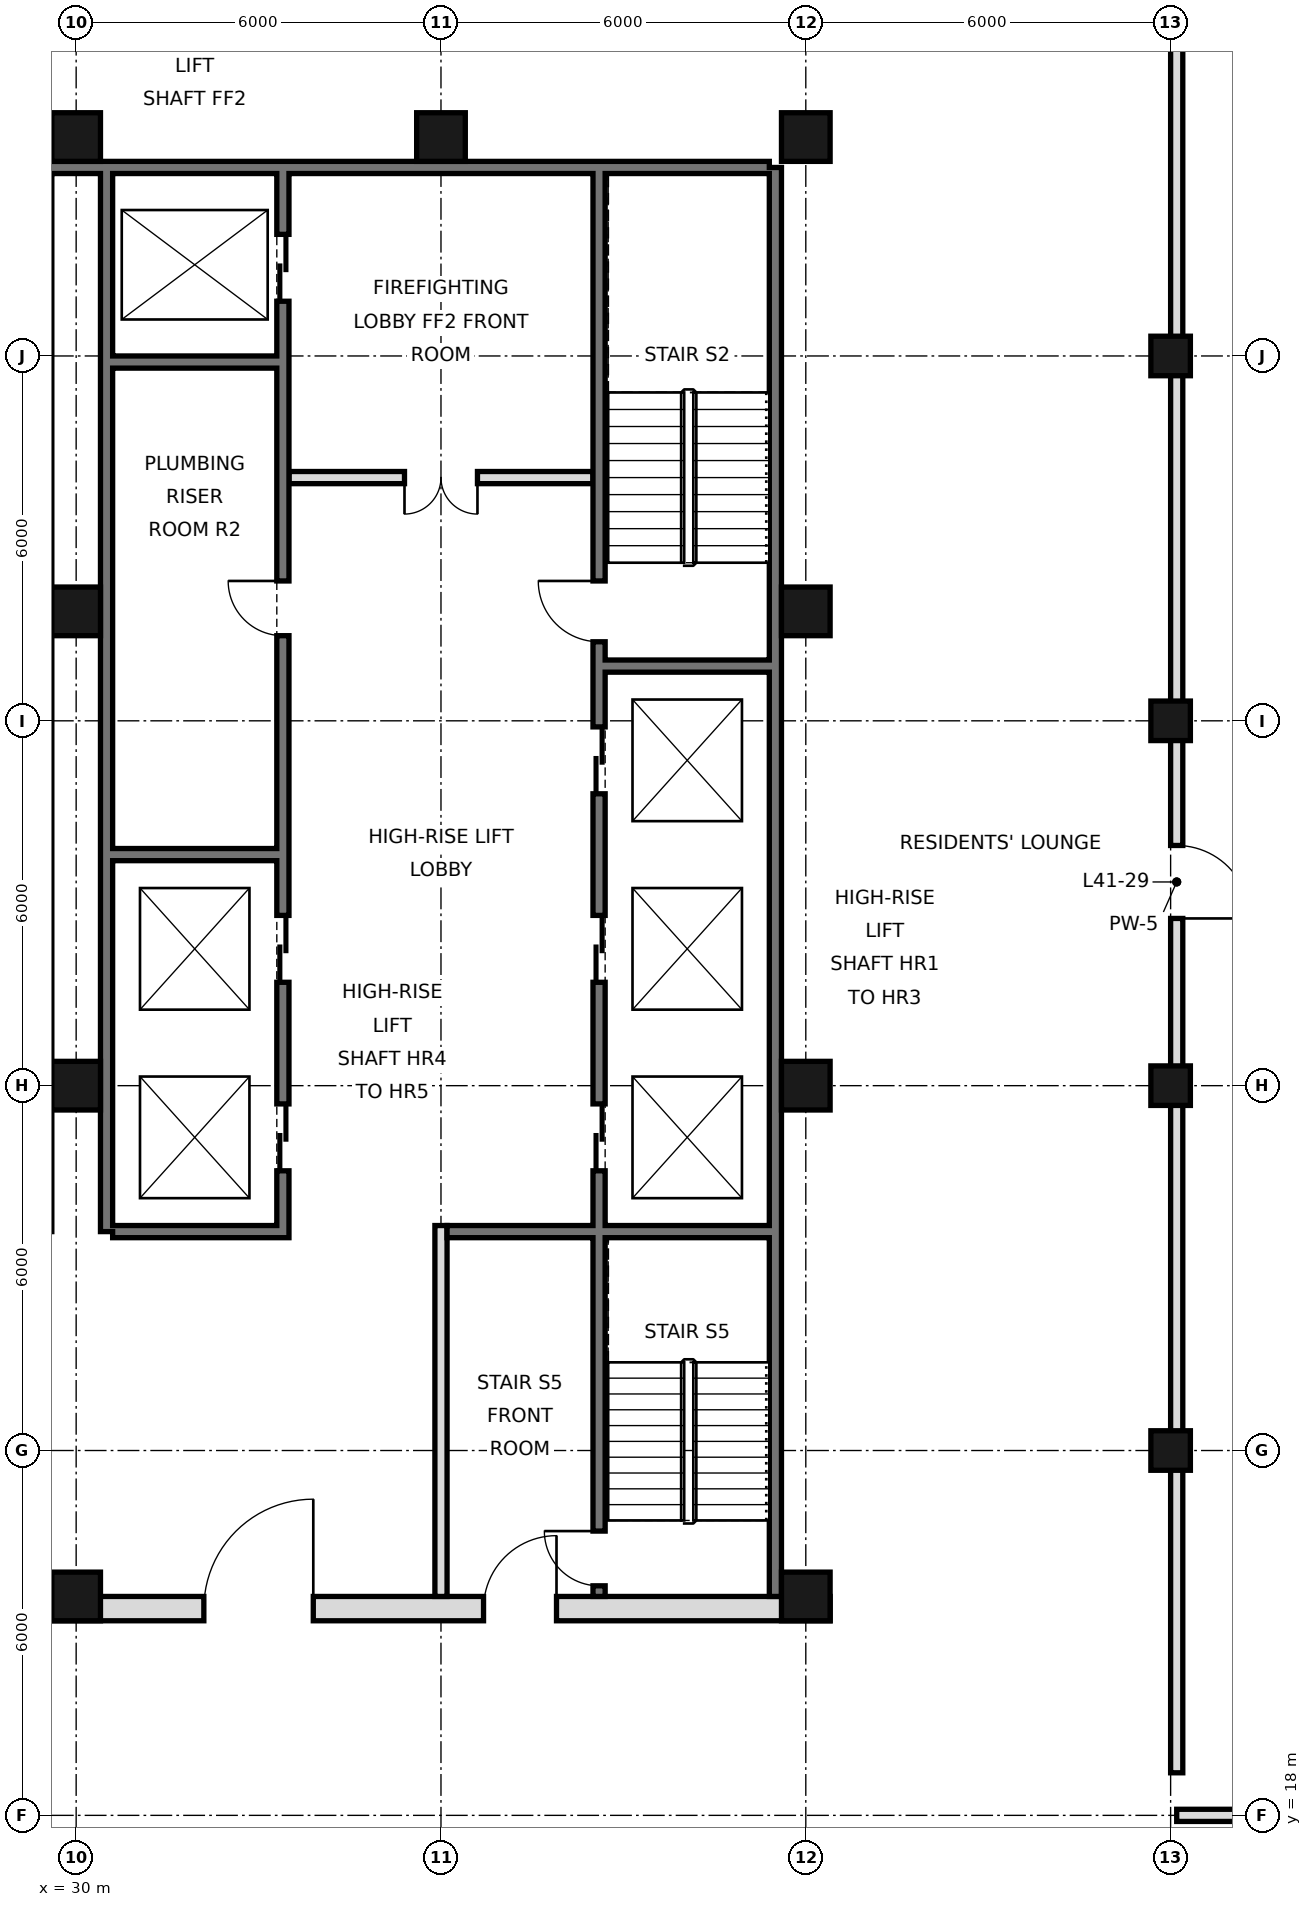
"""IFC4 building model, lengths in metres.
Left out: names, types, materials, properties, quantities, classifications, styles, units other than length and angle.
Written with IfcOpenShell. Run it as: python <this file> out.ifc"""

import sys

from ifc_helpers import new_model, si_unit, direction, frame, frame_2d, origin, origin_2d, place, context, subcontext, project, spatial, rectangle, hollow_rectangle, extrude, element, fill, save


model = new_model("IFC4")
c1 = context("Model", 3, precision=1e-05, world=origin(), true_north=direction((0.0, 1.0)))
c2 = subcontext(c1, "Body", "Model", "MODEL_VIEW")
j1 = project(units=[si_unit("LENGTHUNIT", "METRE"), si_unit("PLANEANGLEUNIT", "RADIAN")], contexts=[c1])
p1 = place(None, origin())
s1 = spatial("IfcSite", under=j1, at=p1, CompositionType="ELEMENT")
p2 = place(p1, origin())
s2 = spatial("IfcBuilding", under=s1, at=p2, CompositionType="ELEMENT")
p3 = place(p2, frame((0.0, 0.0, 178.0)))
s3 = spatial("IfcBuildingStorey", under=s2, at=p3, CompositionType="ELEMENT", Elevation=178.0)
for number, where, z_axis, x_axis in (
    (1, (30.0, 21.6, 0.0), (0.0, 0.0, 1.0), (1.0, 0.0, 0.0)),
    (2, (30.0, 30.0, 0.0), (0.0, 0.0, 1.0), (1.0, 0.0, 0.0)),
    (3, (30.0, 37.8, 0.0), (0.0, 0.0, 1.0), (1.0, 0.0, 0.0)),
    (4, (30.0, 45.6, 0.0), (0.0, 0.0, 1.0), (1.0, 0.0, 0.0)),
    (5, (36.0, 45.6, 0.0), (0.0, 0.0, 1.0), (1.0, 0.0, 0.0)),
    (6, (42.0, 21.6, 0.0), (0.0, 0.0, 1.0), (1.0, 0.0, 0.0)),
    (7, (42.0, 30.0, 0.0), (0.0, 0.0, 1.0), (1.0, 0.0, 0.0)),
    (8, (42.0, 37.8, 0.0), (0.0, 0.0, 1.0), (1.0, 0.0, 0.0)),
    (9, (42.0, 45.6, 0.0), (0.0, 0.0, 1.0), (1.0, 0.0, 0.0)),
):
    element("IfcColumn", number, at=place(p3, frame(where, z_axis=z_axis, x_axis=x_axis)), inside=s3, PredefinedType="COLUMN", context=c2, shape_type="SweptSolid", body=[
        extrude(hollow_rectangle(XDim=0.8, YDim=0.8, WallThickness=0.045, at=origin_2d()), origin(), (0.0, 0.0, 1.0), 3.6),
    ])
for number, where, z_axis, x_axis in (
    (10, (48.0, 24.0, 0.0), (0.0, 0.0, 1.0), (1.0, 0.0, 0.0)),
    (11, (48.0, 30.0, 0.0), (0.0, 0.0, 1.0), (1.0, 0.0, 0.0)),
    (12, (48.0, 36.0, 0.0), (0.0, 0.0, 1.0), (1.0, 0.0, 0.0)),
    (13, (48.0, 42.0, 0.0), (0.0, 0.0, 1.0), (1.0, 0.0, 0.0)),
):
    element("IfcColumn", number, at=place(p3, frame(where, z_axis=z_axis, x_axis=x_axis)), inside=s3, PredefinedType="COLUMN", context=c2, shape_type="SweptSolid", body=[
        extrude(hollow_rectangle(XDim=0.65, YDim=0.65, WallThickness=0.032, at=origin_2d()), origin(), (0.0, 0.0, 1.0), 3.6),
    ])
p4 = place(p3, frame((48.1, 18.7, 0.0), z_axis=(0.0, 0.0, 1.0), x_axis=(0.0, 1.0, 0.0)))
e14 = element("IfcWall", 14, at=p4, inside=s3, PredefinedType="SOLIDWALL", context=c2, shape_type="SweptSolid", body=[
    extrude(rectangle(XDim=29.3, YDim=0.2, at=frame_2d((14.65, 0.0))), origin(), (0.0, 0.0, 1.0), 2.72),
])
p5 = place(p4, frame((14.05, 0.0, 0.0)))
e15 = element("IfcOpeningElement", 15, at=p5, cuts=e14, PredefinedType="OPENING", context=c2, shape_type="SweptSolid", body=[
    extrude(rectangle(XDim=1.2, YDim=2.4, at=frame_2d((0.6, 1.2))), frame((0.0, 0.11, 0.0), z_axis=(0.0, -1.0, 0.0), x_axis=(1.0, 0.0, 0.0)), (0.0, 0.0, 1.0), 0.22),
])
p6 = place(p3, frame((48.1, 18.0, 0.0), z_axis=(0.0, 0.0, 1.0), x_axis=(1.0, 0.0, 0.0)))
e16 = element("IfcWall", 16, at=p6, inside=s3, PredefinedType="SOLIDWALL", context=c2, shape_type="SweptSolid", body=[
    extrude(rectangle(XDim=7.1, YDim=0.2, at=frame_2d((3.55, 0.0))), origin(), (0.0, 0.0, 1.0), 2.72),
])
p7 = place(p3, frame((41.5, 21.6, 0.0), z_axis=(0.0, 0.0, 1.0), x_axis=(0.0, 1.0, 0.0)))
e17 = element("IfcWall", 17, at=p7, inside=s3, PredefinedType="SOLIDWALL", context=c2, shape_type="SweptSolid", body=[
    extrude(rectangle(XDim=23.5, YDim=0.2, at=frame_2d((11.75, 0.0))), origin(), (0.0, 0.0, 1.0), 3.42),
])
p8 = place(p3, frame((6.6, 45.1, 0.0), z_axis=(0.0, 0.0, 1.0), x_axis=(1.0, 0.0, 0.0)))
e18 = element("IfcWall", 18, at=p8, inside=s3, PredefinedType="SOLIDWALL", context=c2, shape_type="SweptSolid", body=[
    extrude(rectangle(XDim=34.8, YDim=0.2, at=frame_2d((17.4, 0.0))), origin(), (0.0, 0.0, 1.0), 3.42),
])
p9 = place(p3, frame((30.5, 27.6, 0.0), z_axis=(0.0, 0.0, 1.0), x_axis=(0.0, 1.0, 0.0)))
e19 = element("IfcWall", 19, at=p9, inside=s3, PredefinedType="SOLIDWALL", context=c2, shape_type="SweptSolid", body=[
    extrude(rectangle(XDim=17.5, YDim=0.2, at=frame_2d((8.75, 0.0))), origin(), (0.0, 0.0, 1.0), 3.42),
])
p10 = place(p3, frame((5.6, 21.4, 0.0), z_axis=(0.0, 0.0, 1.0), x_axis=(1.0, 0.0, 0.0)))
e20 = element("IfcWall", 20, at=p10, inside=s3, PredefinedType="SOLIDWALL", context=c2, shape_type="SweptSolid", body=[
    extrude(rectangle(XDim=36.8, YDim=0.4, at=frame_2d((18.4, 0.0))), origin(), (0.0, 0.0, 1.0), 3.42),
])
p11 = place(p10, frame((8.5, 0.0, 0.0)))
e21 = element("IfcOpeningElement", 21, at=p11, cuts=e20, PredefinedType="OPENING", context=c2, shape_type="SweptSolid", body=[
    extrude(rectangle(XDim=1.8, YDim=2.1, at=frame_2d((0.9, 1.05))), frame((0.0, 0.21, 0.0), z_axis=(0.0, -1.0, 0.0), x_axis=(1.0, 0.0, 0.0)), (0.0, 0.0, 1.0), 0.42),
])
p12 = place(p10, frame((17.5, 0.0, 0.0)))
e22 = element("IfcOpeningElement", 22, at=p12, cuts=e20, PredefinedType="OPENING", context=c2, shape_type="SweptSolid", body=[
    extrude(rectangle(XDim=1.8, YDim=2.1, at=frame_2d((0.9, 1.05))), frame((0.0, 0.21, 0.0), z_axis=(0.0, -1.0, 0.0), x_axis=(1.0, 0.0, 0.0)), (0.0, 0.0, 1.0), 0.42),
])
p13 = place(p10, frame((26.5, 0.0, 0.0)))
e23 = element("IfcOpeningElement", 23, at=p13, cuts=e20, PredefinedType="OPENING", context=c2, shape_type="SweptSolid", body=[
    extrude(rectangle(XDim=1.8, YDim=2.1, at=frame_2d((0.9, 1.05))), frame((0.0, 0.21, 0.0), z_axis=(0.0, -1.0, 0.0), x_axis=(1.0, 0.0, 0.0)), (0.0, 0.0, 1.0), 0.42),
])
p14 = place(p10, frame((4.5, 0.0, 0.0)))
e24 = element("IfcOpeningElement", 24, at=p14, cuts=e20, PredefinedType="OPENING", context=c2, shape_type="SweptSolid", body=[
    extrude(rectangle(XDim=1.2, YDim=2.1, at=frame_2d((0.6, 1.05))), frame((0.0, 0.21, 0.0), z_axis=(0.0, -1.0, 0.0), x_axis=(1.0, 0.0, 0.0)), (0.0, 0.0, 1.0), 0.42),
])
p15 = place(p10, frame((31.1, 0.0, 0.0)))
e25 = element("IfcOpeningElement", 25, at=p15, cuts=e20, PredefinedType="OPENING", context=c2, shape_type="SweptSolid", body=[
    extrude(rectangle(XDim=1.2, YDim=2.1, at=frame_2d((0.6, 1.05))), frame((0.0, 0.21, 0.0), z_axis=(0.0, -1.0, 0.0), x_axis=(1.0, 0.0, 0.0)), (0.0, 0.0, 1.0), 0.42),
])
p16 = place(p3, frame((33.4, 27.5, 0.0), z_axis=(0.0, 0.0, 1.0), x_axis=(0.0, 1.0, 0.0)))
e26 = element("IfcWall", 26, at=p16, inside=s3, PredefinedType="SOLIDWALL", context=c2, shape_type="SweptSolid", body=[
    extrude(rectangle(XDim=17.5, YDim=0.2, at=frame_2d((8.75, 0.0))), origin(), (0.0, 0.0, 1.0), 3.42),
])
p17 = place(p16, frame((1.1, 0.0, 0.0)))
e27 = element("IfcOpeningElement", 27, at=p17, cuts=e26, PredefinedType="OPENING", context=c2, shape_type="SweptSolid", body=[
    extrude(rectangle(XDim=1.1, YDim=2.1, at=frame_2d((0.55, 1.05))), frame((0.0, 0.11, 0.0), z_axis=(0.0, -1.0, 0.0), x_axis=(1.0, 0.0, 0.0)), (0.0, 0.0, 1.0), 0.22),
])
p18 = place(p16, frame((4.2, 0.0, 0.0)))
e28 = element("IfcOpeningElement", 28, at=p18, cuts=e26, PredefinedType="OPENING", context=c2, shape_type="SweptSolid", body=[
    extrude(rectangle(XDim=1.1, YDim=2.1, at=frame_2d((0.55, 1.05))), frame((0.0, 0.11, 0.0), z_axis=(0.0, -1.0, 0.0), x_axis=(1.0, 0.0, 0.0)), (0.0, 0.0, 1.0), 0.22),
])
p19 = place(p16, frame((15.4, 0.0, 0.0)))
e29 = element("IfcOpeningElement", 29, at=p19, cuts=e26, PredefinedType="OPENING", context=c2, shape_type="SweptSolid", body=[
    extrude(rectangle(XDim=1.1, YDim=2.1, at=frame_2d((0.55, 1.05))), frame((0.0, 0.11, 0.0), z_axis=(0.0, -1.0, 0.0), x_axis=(1.0, 0.0, 0.0)), (0.0, 0.0, 1.0), 0.22),
])
p20 = place(p16, frame((9.9, 0.0, 0.0)))
e30 = element("IfcOpeningElement", 30, at=p20, cuts=e26, PredefinedType="OPENING", context=c2, shape_type="SweptSolid", body=[
    extrude(rectangle(XDim=0.9, YDim=2.1, at=frame_2d((0.45, 1.05))), frame((0.0, 0.11, 0.0), z_axis=(0.0, -1.0, 0.0), x_axis=(1.0, 0.0, 0.0)), (0.0, 0.0, 1.0), 0.22),
])
p21 = place(p3, frame((36.0, 21.6, 0.0), z_axis=(0.0, 0.0, 1.0), x_axis=(0.0, 1.0, 0.0)))
e31 = element("IfcWall", 31, at=p21, inside=s3, PredefinedType="PARTITIONING", context=c2, shape_type="SweptSolid", body=[
    extrude(rectangle(XDim=6.1, YDim=0.2, at=frame_2d((3.05, 0.0))), origin(), (0.0, 0.0, 1.0), 3.42),
])
p22 = place(p3, frame((38.6, 21.6, 0.0), z_axis=(0.0, 0.0, 1.0), x_axis=(0.0, 1.0, 0.0)))
e32 = element("IfcWall", 32, at=p22, inside=s3, PredefinedType="SOLIDWALL", context=c2, shape_type="SweptSolid", body=[
    extrude(rectangle(XDim=23.4, YDim=0.2, at=frame_2d((11.7, 0.0))), origin(), (0.0, 0.0, 1.0), 3.42),
])
p23 = place(p22, frame((7.0, 0.0, 0.0)))
e33 = element("IfcOpeningElement", 33, at=p23, cuts=e32, PredefinedType="OPENING", context=c2, shape_type="SweptSolid", body=[
    extrude(rectangle(XDim=1.1, YDim=2.1, at=frame_2d((0.55, 1.05))), frame((0.0, 0.11, 0.0), z_axis=(0.0, -1.0, 0.0), x_axis=(1.0, 0.0, 0.0)), (0.0, 0.0, 1.0), 0.22),
])
p24 = place(p22, frame((10.1, 0.0, 0.0)))
e34 = element("IfcOpeningElement", 34, at=p24, cuts=e32, PredefinedType="OPENING", context=c2, shape_type="SweptSolid", body=[
    extrude(rectangle(XDim=1.1, YDim=2.1, at=frame_2d((0.55, 1.05))), frame((0.0, 0.11, 0.0), z_axis=(0.0, -1.0, 0.0), x_axis=(1.0, 0.0, 0.0)), (0.0, 0.0, 1.0), 0.22),
])
p25 = place(p22, frame((13.2, 0.0, 0.0)))
e35 = element("IfcOpeningElement", 35, at=p25, cuts=e32, PredefinedType="OPENING", context=c2, shape_type="SweptSolid", body=[
    extrude(rectangle(XDim=1.1, YDim=2.1, at=frame_2d((0.55, 1.05))), frame((0.0, 0.11, 0.0), z_axis=(0.0, -1.0, 0.0), x_axis=(1.0, 0.0, 0.0)), (0.0, 0.0, 1.0), 0.22),
])
p26 = place(p22, frame((15.7, 0.0, 0.0)))
e36 = element("IfcOpeningElement", 36, at=p26, cuts=e32, PredefinedType="OPENING", context=c2, shape_type="SweptSolid", body=[
    extrude(rectangle(XDim=1.0, YDim=2.1, at=frame_2d((0.5, 1.05))), frame((0.0, 0.11, 0.0), z_axis=(0.0, -1.0, 0.0), x_axis=(1.0, 0.0, 0.0)), (0.0, 0.0, 1.0), 0.22),
])
p27 = place(p22, frame((0.175, 0.0, 0.0)))
e37 = element("IfcOpeningElement", 37, at=p27, cuts=e32, PredefinedType="OPENING", context=c2, shape_type="SweptSolid", body=[
    extrude(rectangle(XDim=0.9, YDim=2.1, at=frame_2d((0.45, 1.05))), frame((0.0, 0.11, 0.0), z_axis=(0.0, -1.0, 0.0), x_axis=(1.0, 0.0, 0.0)), (0.0, 0.0, 1.0), 0.22),
])
p28 = place(p3, frame((30.6, 27.6, 0.0), z_axis=(0.0, 0.0, 1.0), x_axis=(1.0, 0.0, 0.0)))
e38 = element("IfcWall", 38, at=p28, inside=s3, PredefinedType="SOLIDWALL", context=c2, shape_type="SweptSolid", body=[
    extrude(rectangle(XDim=2.7, YDim=0.2, at=frame_2d((1.35, 0.0))), origin(), (0.0, 0.0, 1.0), 3.42),
])
p29 = place(p3, frame((36.1, 27.6, 0.0), z_axis=(0.0, 0.0, 1.0), x_axis=(1.0, 0.0, 0.0)))
e39 = element("IfcWall", 39, at=p29, inside=s3, PredefinedType="SOLIDWALL", context=c2, shape_type="SweptSolid", body=[
    extrude(rectangle(XDim=5.3, YDim=0.2, at=frame_2d((2.65, 0.0))), origin(), (0.0, 0.0, 1.0), 3.42),
])
for number, where, z_axis, x_axis in (
    (40, (30.6, 33.8, 0.0), (0.0, 0.0, 1.0), (1.0, 0.0, 0.0)),
    (41, (38.7, 36.9, 0.0), (0.0, 0.0, 1.0), (1.0, 0.0, 0.0)),
):
    element("IfcWall", number, at=place(p3, frame(where, z_axis=z_axis, x_axis=x_axis)), inside=s3, PredefinedType="SOLIDWALL", context=c2, shape_type="SweptSolid", body=[
        extrude(rectangle(XDim=2.7, YDim=0.2, at=frame_2d((1.35, 0.0))), origin(), (0.0, 0.0, 1.0), 3.42),
    ])
p30 = place(p3, frame((33.5, 40.0, 0.0), z_axis=(0.0, 0.0, 1.0), x_axis=(1.0, 0.0, 0.0)))
e42 = element("IfcWall", 42, at=p30, inside=s3, PredefinedType="PARTITIONING", context=c2, shape_type="SweptSolid", body=[
    extrude(rectangle(XDim=5.0, YDim=0.2, at=frame_2d((2.5, 0.0))), origin(), (0.0, 0.0, 1.0), 3.42),
])
p31 = place(p30, frame((1.9, 0.0, 0.0)))
e43 = element("IfcOpeningElement", 43, at=p31, cuts=e42, PredefinedType="OPENING", context=c2, shape_type="SweptSolid", body=[
    extrude(rectangle(XDim=1.2, YDim=2.1, at=frame_2d((0.6, 1.05))), frame((0.0, 0.11, 0.0), z_axis=(0.0, -1.0, 0.0), x_axis=(1.0, 0.0, 0.0)), (0.0, 0.0, 1.0), 0.22),
])
p32 = place(p3, frame((30.6, 41.9, 0.0), z_axis=(0.0, 0.0, 1.0), x_axis=(1.0, 0.0, 0.0)))
e44 = element("IfcWall", 44, at=p32, inside=s3, PredefinedType="SOLIDWALL", context=c2, shape_type="SweptSolid", body=[
    extrude(rectangle(XDim=2.7, YDim=0.2, at=frame_2d((1.35, 0.0))), origin(), (0.0, 0.0, 1.0), 3.42),
])
p33 = place(p5, frame((1.2, 0.0, 0.0), z_axis=(0.0, 0.0, 1.0), x_axis=(-1.0, 0.0, 0.0)))
e45 = element("IfcDoor", 45, at=p33, inside=s3, OperationType="SINGLE_SWING_RIGHT", PredefinedType="DOOR", context=c2, shape_type="SweptSolid", body=[
    extrude(rectangle(XDim=1.2, YDim=2.4, at=frame_2d((0.6, 1.2))), frame((0.0, 0.025, 0.0), z_axis=(0.0, -1.0, 0.0), x_axis=(1.0, 0.0, 0.0)), (0.0, 0.0, 1.0), 0.05),
])
fill(e15, e45)
p34 = place(p13, frame((1.8, 0.0, 0.0), z_axis=(0.0, 0.0, 1.0), x_axis=(-1.0, 0.0, 0.0)))
e46 = element("IfcDoor", 46, at=p34, inside=s3, OperationType="SINGLE_SWING_LEFT", PredefinedType="DOOR", context=c2, shape_type="SweptSolid", body=[
    extrude(rectangle(XDim=1.8, YDim=2.1, at=frame_2d((0.9, 1.05))), frame((0.0, 0.025, 0.0), z_axis=(0.0, -1.0, 0.0), x_axis=(1.0, 0.0, 0.0)), (0.0, 0.0, 1.0), 0.05),
])
fill(e23, e46)
p35 = place(p15, frame((1.2, 0.0, 0.0), z_axis=(0.0, 0.0, 1.0), x_axis=(-1.0, 0.0, 0.0)))
e47 = element("IfcDoor", 47, at=p35, inside=s3, OperationType="SINGLE_SWING_LEFT", PredefinedType="DOOR", context=c2, shape_type="SweptSolid", body=[
    extrude(rectangle(XDim=1.2, YDim=2.1, at=frame_2d((0.6, 1.05))), frame((0.0, 0.025, 0.0), z_axis=(0.0, -1.0, 0.0), x_axis=(1.0, 0.0, 0.0)), (0.0, 0.0, 1.0), 0.05),
])
fill(e25, e47)
p36 = place(p31, frame((1.2, 0.0, 0.0), z_axis=(0.0, 0.0, 1.0), x_axis=(-1.0, 0.0, 0.0)))
e48 = element("IfcDoor", 48, at=p36, inside=s3, OperationType="DOUBLE_DOOR_SINGLE_SWING", PredefinedType="DOOR", context=c2, shape_type="SweptSolid", body=[
    extrude(rectangle(XDim=1.2, YDim=2.1, at=frame_2d((0.6, 1.05))), frame((0.0, 0.025, 0.0), z_axis=(0.0, -1.0, 0.0), x_axis=(1.0, 0.0, 0.0)), (0.0, 0.0, 1.0), 0.05),
])
fill(e43, e48)
p37 = place(p23, origin())
e49 = element("IfcDoor", 49, at=p37, inside=s3, OperationType="DOUBLE_DOOR_SLIDING", PredefinedType="DOOR", context=c2, shape_type="SweptSolid", body=[
    extrude(rectangle(XDim=1.1, YDim=2.1, at=frame_2d((0.55, 1.05))), frame((0.0, 0.025, 0.0), z_axis=(0.0, -1.0, 0.0), x_axis=(1.0, 0.0, 0.0)), (0.0, 0.0, 1.0), 0.05),
])
fill(e33, e49)
p38 = place(p24, origin())
e50 = element("IfcDoor", 50, at=p38, inside=s3, OperationType="DOUBLE_DOOR_SLIDING", PredefinedType="DOOR", context=c2, shape_type="SweptSolid", body=[
    extrude(rectangle(XDim=1.1, YDim=2.1, at=frame_2d((0.55, 1.05))), frame((0.0, 0.025, 0.0), z_axis=(0.0, -1.0, 0.0), x_axis=(1.0, 0.0, 0.0)), (0.0, 0.0, 1.0), 0.05),
])
fill(e34, e50)
p39 = place(p25, origin())
e51 = element("IfcDoor", 51, at=p39, inside=s3, OperationType="DOUBLE_DOOR_SLIDING", PredefinedType="DOOR", context=c2, shape_type="SweptSolid", body=[
    extrude(rectangle(XDim=1.1, YDim=2.1, at=frame_2d((0.55, 1.05))), frame((0.0, 0.025, 0.0), z_axis=(0.0, -1.0, 0.0), x_axis=(1.0, 0.0, 0.0)), (0.0, 0.0, 1.0), 0.05),
])
fill(e35, e51)
p40 = place(p17, origin())
e52 = element("IfcDoor", 52, at=p40, inside=s3, OperationType="DOUBLE_DOOR_SLIDING", PredefinedType="DOOR", context=c2, shape_type="SweptSolid", body=[
    extrude(rectangle(XDim=1.1, YDim=2.1, at=frame_2d((0.55, 1.05))), frame((0.0, 0.025, 0.0), z_axis=(0.0, -1.0, 0.0), x_axis=(1.0, 0.0, 0.0)), (0.0, 0.0, 1.0), 0.05),
])
fill(e27, e52)
p41 = place(p18, origin())
e53 = element("IfcDoor", 53, at=p41, inside=s3, OperationType="DOUBLE_DOOR_SLIDING", PredefinedType="DOOR", context=c2, shape_type="SweptSolid", body=[
    extrude(rectangle(XDim=1.1, YDim=2.1, at=frame_2d((0.55, 1.05))), frame((0.0, 0.025, 0.0), z_axis=(0.0, -1.0, 0.0), x_axis=(1.0, 0.0, 0.0)), (0.0, 0.0, 1.0), 0.05),
])
fill(e28, e53)
p42 = place(p19, origin())
e54 = element("IfcDoor", 54, at=p42, inside=s3, OperationType="DOUBLE_DOOR_SLIDING", PredefinedType="DOOR", context=c2, shape_type="SweptSolid", body=[
    extrude(rectangle(XDim=1.1, YDim=2.1, at=frame_2d((0.55, 1.05))), frame((0.0, 0.025, 0.0), z_axis=(0.0, -1.0, 0.0), x_axis=(1.0, 0.0, 0.0)), (0.0, 0.0, 1.0), 0.05),
])
fill(e29, e54)
p43 = place(p26, frame((1.0, 0.0, 0.0), z_axis=(0.0, 0.0, 1.0), x_axis=(-1.0, 0.0, 0.0)))
e55 = element("IfcDoor", 55, at=p43, inside=s3, OperationType="SINGLE_SWING_LEFT", PredefinedType="DOOR", context=c2, shape_type="SweptSolid", body=[
    extrude(rectangle(XDim=1.0, YDim=2.1, at=frame_2d((0.5, 1.05))), frame((0.0, 0.025, 0.0), z_axis=(0.0, -1.0, 0.0), x_axis=(1.0, 0.0, 0.0)), (0.0, 0.0, 1.0), 0.05),
])
fill(e36, e55)
p44 = place(p27, frame((0.9, 0.0, 0.0), z_axis=(0.0, 0.0, 1.0), x_axis=(-1.0, 0.0, 0.0)))
e56 = element("IfcDoor", 56, at=p44, inside=s3, OperationType="SINGLE_SWING_LEFT", PredefinedType="DOOR", context=c2, shape_type="SweptSolid", body=[
    extrude(rectangle(XDim=0.9, YDim=2.1, at=frame_2d((0.45, 1.05))), frame((0.0, 0.025, 0.0), z_axis=(0.0, -1.0, 0.0), x_axis=(1.0, 0.0, 0.0)), (0.0, 0.0, 1.0), 0.05),
])
fill(e37, e56)
p45 = place(p20, frame((0.9, 0.0, 0.0), z_axis=(0.0, 0.0, 1.0), x_axis=(-1.0, 0.0, 0.0)))
e57 = element("IfcDoor", 57, at=p45, inside=s3, OperationType="SINGLE_SWING_LEFT", PredefinedType="DOOR", context=c2, shape_type="SweptSolid", body=[
    extrude(rectangle(XDim=0.9, YDim=2.1, at=frame_2d((0.45, 1.05))), frame((0.0, 0.025, 0.0), z_axis=(0.0, -1.0, 0.0), x_axis=(1.0, 0.0, 0.0)), (0.0, 0.0, 1.0), 0.05),
])
fill(e30, e57)
save(model, sys.argv[1])
